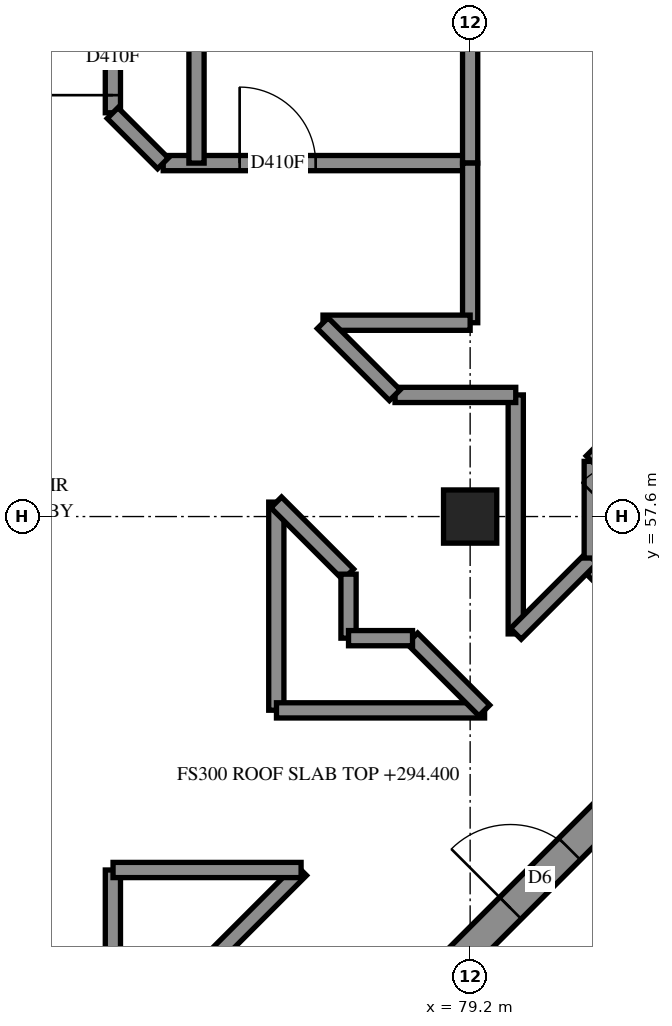
"""IFC4 building model, lengths in metres.
Left out: names, types, materials, properties, quantities, classifications, styles, units other than length and angle.
Written with IfcOpenShell. Run it as: python <this file> out.ifc"""

import sys

from ifc_helpers import new_model, si_unit, direction, frame, frame_2d, origin, origin_2d, place, context, subcontext, project, spatial, polyline, rectangle, outline, extrude, element, fill, save


model = new_model("IFC4")
c1 = context("Model", 3, precision=1e-05, world=origin(), true_north=direction((0.0, 1.0)))
c2 = subcontext(c1, "Body", "Model", "MODEL_VIEW")
j1 = project(units=[si_unit("LENGTHUNIT", "METRE"), si_unit("PLANEANGLEUNIT", "RADIAN")], contexts=[c1])
p1 = place(None, origin())
s1 = spatial("IfcSite", under=j1, at=p1, CompositionType="ELEMENT")
p2 = place(p1, origin())
s2 = spatial("IfcBuilding", under=s1, at=p2, CompositionType="ELEMENT")
p3 = place(p2, frame((0.0, 0.0, 294.4)))
s3 = spatial("IfcBuildingStorey", under=s2, at=p3, CompositionType="ELEMENT", Elevation=294.4)
p4 = place(p3, frame((79.2, 57.6, 0.0), z_axis=(0.0, 0.0, 1.0), x_axis=(1.0, 0.0, 0.0)))
e1 = element("IfcColumn", 1, at=p4, inside=s3, PredefinedType="COLUMN", context=c2, shape_type="SweptSolid", body=[
    extrude(rectangle(XDim=0.7, YDim=0.7, at=origin_2d()), origin(), (0.0, 0.0, 1.0), 3.5),
])
p5 = place(p3, frame((76.513, 49.231, -0.3), z_axis=(0.0, 0.0, 1.0), x_axis=(0.7071067812, 0.7071067812, 0.0)))
e2 = element("IfcWall", 2, at=p5, inside=s3, PredefinedType="SHEAR", context=c2, shape_type="SweptSolid", body=[
    extrude(outline(polyline([(0.0, 0.0), (14.4, 0.0), (14.4, 3.1), (0.0, 3.1), (0.0, 0.0)])), frame((0.0, 0.2, 0.0), z_axis=(0.0, -1.0, 0.0), x_axis=(1.0, 0.0, 0.0)), (0.0, 0.0, 1.0), 0.4),
])
p6 = place(p5, frame((4.55, 0.0, 0.3)))
e3 = element("IfcOpeningElement", 3, at=p6, cuts=e2, PredefinedType="OPENING", context=c2, shape_type="SweptSolid", body=[
    extrude(rectangle(XDim=1.1, YDim=2.1, at=frame_2d((0.55, 1.05))), frame((0.0, 0.21, 0.0), z_axis=(0.0, -1.0, 0.0), x_axis=(1.0, 0.0, 0.0)), (0.0, 0.0, 1.0), 0.42),
])
p7 = place(p5, frame((11.35, 0.0, 0.3)))
e4 = element("IfcOpeningElement", 4, at=p7, cuts=e2, PredefinedType="OPENING", context=c2, shape_type="SweptSolid", body=[
    extrude(rectangle(XDim=1.1, YDim=2.1, at=frame_2d((0.55, 1.05))), frame((0.0, 0.21, 0.0), z_axis=(0.0, -1.0, 0.0), x_axis=(1.0, 0.0, 0.0)), (0.0, 0.0, 1.0), 0.42),
])
p8 = place(p3, frame((80.803, 56.77, 0.0), z_axis=(0.0, 0.0, 1.0), x_axis=(0.7069896038, 0.7072239391, 0.0)))
e5 = element("IfcWall", 5, at=p8, inside=s3, PredefinedType="PARTITIONING", context=c2, shape_type="SweptSolid", body=[
    extrude(rectangle(XDim=8.535, YDim=0.2, at=frame_2d((4.267, 0.0))), origin(), (0.0, 0.0, 1.0), 3.5),
])
p9 = place(p8, frame((0.811, 0.0, 0.0)))
e6 = element("IfcOpeningElement", 6, at=p9, cuts=e5, PredefinedType="OPENING", context=c2, shape_type="SweptSolid", body=[
    extrude(rectangle(XDim=1.0, YDim=2.1, at=frame_2d((0.5, 1.05))), frame((0.0, 0.11, 0.0), z_axis=(0.0, -1.0, 0.0), x_axis=(1.0, 0.0, 0.0)), (0.0, 0.0, 1.0), 0.22),
])
p10 = place(p3, frame((74.5, 62.912, 0.0), z_axis=(0.0, 0.0, 1.0), x_axis=(0.0, 1.0, 0.0)))
e7 = element("IfcWall", 7, at=p10, inside=s3, PredefinedType="PARTITIONING", context=c2, shape_type="SweptSolid", body=[
    extrude(rectangle(XDim=4.388, YDim=0.2, at=frame_2d((2.194, 0.0))), origin(), (0.0, 0.0, 1.0), 3.5),
])
p11 = place(p10, frame((0.232, 0.0, 0.0)))
e8 = element("IfcOpeningElement", 8, at=p11, cuts=e7, PredefinedType="OPENING", context=c2, shape_type="SweptSolid", body=[
    extrude(rectangle(XDim=1.0, YDim=2.1, at=frame_2d((0.5, 1.05))), frame((0.0, 0.11, 0.0), z_axis=(0.0, -1.0, 0.0), x_axis=(1.0, 0.0, 0.0)), (0.0, 0.0, 1.0), 0.22),
])
p12 = place(p3, frame((75.162, 62.25, 0.0), z_axis=(0.0, 0.0, 1.0), x_axis=(1.0, 0.0, 0.0)))
e9 = element("IfcWall", 9, at=p12, inside=s3, PredefinedType="PARTITIONING", context=c2, shape_type="SweptSolid", body=[
    extrude(rectangle(XDim=4.038, YDim=0.2, at=frame_2d((2.019, 0.0))), origin(), (0.0, 0.0, 1.0), 3.5),
])
p13 = place(p12, frame((1.006, 0.0, 0.0)))
e10 = element("IfcOpeningElement", 10, at=p13, cuts=e9, PredefinedType="OPENING", context=c2, shape_type="SweptSolid", body=[
    extrude(rectangle(XDim=1.0, YDim=2.1, at=frame_2d((0.5, 1.05))), frame((0.0, 0.11, 0.0), z_axis=(0.0, -1.0, 0.0), x_axis=(1.0, 0.0, 0.0)), (0.0, 0.0, 1.0), 0.22),
])
p14 = place(p3, frame((74.501, 50.473, 0.0), z_axis=(0.0, 0.0, 1.0), x_axis=(0.7071067812, 0.7071067812, 0.0)))
e11 = element("IfcWall", 11, at=p14, inside=s3, PredefinedType="PARTITIONING", context=c2, shape_type="SweptSolid", body=[
    extrude(rectangle(XDim=3.502, YDim=0.2, at=frame_2d((1.751, 0.0))), origin(), (0.0, 0.0, 1.0), 3.5),
])
p15 = place(p3, frame((79.8, 56.056, 0.0), z_axis=(0.0, 0.0, 1.0), x_axis=(0.0, 1.0, 0.0)))
e12 = element("IfcWall", 12, at=p15, inside=s3, PredefinedType="PARTITIONING", context=c2, shape_type="SweptSolid", body=[
    extrude(rectangle(XDim=3.144, YDim=0.2, at=frame_2d((1.572, 0.0))), origin(), (0.0, 0.0, 1.0), 3.5),
])
for number, where, z_axis, x_axis in (
    (13, (76.65, 55.052, 0.0), (0.0, 0.0, 1.0), (0.0, 1.0, 0.0)),
    (14, (76.652, 55.05, 0.0), (0.0, 0.0, 1.0), (1.0, 0.0, 0.0)),
):
    element("IfcWall", number, at=place(p3, frame(where, z_axis=z_axis, x_axis=x_axis)), inside=s3, PredefinedType="PARTITIONING", context=c2, shape_type="SweptSolid", body=[
        extrude(rectangle(XDim=2.738, YDim=0.2, at=frame_2d((1.369, 0.0))), origin(), (0.0, 0.0, 1.0), 3.5),
    ])
p16 = place(p3, frame((74.5, 50.474, 0.0), z_axis=(0.0, 0.0, 1.0), x_axis=(0.0, 1.0, 0.0)))
e15 = element("IfcWall", 15, at=p16, inside=s3, PredefinedType="PARTITIONING", context=c2, shape_type="SweptSolid", body=[
    extrude(rectangle(XDim=2.476, YDim=0.2, at=frame_2d((1.238, 0.0))), origin(), (0.0, 0.0, 1.0), 3.5),
])
p17 = place(p3, frame((74.502, 52.95, 0.0), z_axis=(0.0, 0.0, 1.0), x_axis=(1.0, 0.0, 0.0)))
e16 = element("IfcWall", 16, at=p17, inside=s3, PredefinedType="PARTITIONING", context=c2, shape_type="SweptSolid", body=[
    extrude(rectangle(XDim=2.474, YDim=0.2, at=frame_2d((1.237, 0.0))), origin(), (0.0, 0.0, 1.0), 3.5),
])
p18 = place(p3, frame((79.2, 62.25, 0.0), z_axis=(0.0, 0.0, 1.0), x_axis=(0.0, 1.0, 0.0)))
e17 = element("IfcWall", 17, at=p18, inside=s3, PredefinedType="PARTITIONING", context=c2, shape_type="SweptSolid", body=[
    extrude(rectangle(XDim=2.2, YDim=0.2, at=frame_2d((1.1, 0.0))), origin(), (0.0, 0.0, 1.0), 3.5),
])
p19 = place(p3, frame((79.2, 60.15, 0.0), z_axis=(0.0, 0.0, 1.0), x_axis=(0.0, 1.0, 0.0)))
e18 = element("IfcWall", 18, at=p19, inside=s3, PredefinedType="PARTITIONING", context=c2, shape_type="SweptSolid", body=[
    extrude(rectangle(XDim=2.1, YDim=0.2, at=frame_2d((1.05, 0.0))), origin(), (0.0, 0.0, 1.0), 3.5),
])
p20 = place(p3, frame((77.264, 60.15, 0.0), z_axis=(0.0, 0.0, 1.0), x_axis=(1.0, 0.0, 0.0)))
e19 = element("IfcWall", 19, at=p20, inside=s3, PredefinedType="PARTITIONING", context=c2, shape_type="SweptSolid", body=[
    extrude(rectangle(XDim=1.936, YDim=0.2, at=frame_2d((0.968, 0.0))), origin(), (0.0, 0.0, 1.0), 3.5),
])
p21 = place(p3, frame((78.212, 59.2, 0.0), z_axis=(0.0, 0.0, 1.0), x_axis=(1.0, 0.0, 0.0)))
e20 = element("IfcWall", 20, at=p21, inside=s3, PredefinedType="PARTITIONING", context=c2, shape_type="SweptSolid", body=[
    extrude(rectangle(XDim=1.588, YDim=0.2, at=frame_2d((0.794, 0.0))), origin(), (0.0, 0.0, 1.0), 3.5),
])
p22 = place(p3, frame((79.801, 56.057, 0.0), z_axis=(0.0, 0.0, 1.0), x_axis=(0.7071067812, 0.7071067812, 0.0)))
e21 = element("IfcWall", 21, at=p22, inside=s3, PredefinedType="PARTITIONING", context=c2, shape_type="SweptSolid", body=[
    extrude(rectangle(XDim=1.411, YDim=0.2, at=frame_2d((0.706, 0.0))), origin(), (0.0, 0.0, 1.0), 3.5),
])
for number, where, z_axis, x_axis in (
    (22, (78.439, 55.997, 0.0), (0.0, 0.0, 1.0), (0.707, -0.707, 0.0)),
    (23, (77.26, 60.145, 0.0), (0.0, 0.0, 1.0), (0.707, -0.707, 0.0)),
    (24, (76.649, 57.787, 0.0), (0.0, 0.0, 1.0), (0.707, -0.707, 0.0)),
):
    element("IfcWall", number, at=place(p3, frame(where, z_axis=z_axis, x_axis=x_axis)), inside=s3, PredefinedType="PARTITIONING", context=c2, shape_type="SweptSolid", body=[
        extrude(rectangle(XDim=1.341, YDim=0.2, at=frame_2d((0.67, 0.0))), origin(), (0.0, 0.0, 1.0), 3.5),
    ])
p23 = place(p3, frame((80.8, 57.054, 0.0), z_axis=(0.0, 0.0, 1.0), x_axis=(0.0, 1.0, 0.0)))
e25 = element("IfcWall", 25, at=p23, inside=s3, PredefinedType="PARTITIONING", context=c2, shape_type="SweptSolid", body=[
    extrude(rectangle(XDim=1.272, YDim=0.2, at=frame_2d((0.636, 0.0))), origin(), (0.0, 0.0, 1.0), 3.5),
])
p24 = place(p3, frame((74.496, 62.908, 0.0), z_axis=(0.0, 0.0, 1.0), x_axis=(0.7071067812, -0.7071067812, 0.0)))
e26 = element("IfcWall", 26, at=p24, inside=s3, PredefinedType="PARTITIONING", context=c2, shape_type="SweptSolid", body=[
    extrude(rectangle(XDim=0.936, YDim=0.2, at=frame_2d((0.468, 0.0))), origin(), (0.0, 0.0, 1.0), 3.5),
])
for number, where, z_axis, x_axis in (
    (27, (77.6, 56.0, 0.0), (0.0, 0.0, 1.0), (0.0, 1.0, 0.0)),
    (28, (77.6, 56.0, 0.0), (0.0, 0.0, 1.0), (1.0, 0.0, 0.0)),
):
    element("IfcWall", number, at=place(p3, frame(where, z_axis=z_axis, x_axis=x_axis)), inside=s3, PredefinedType="PARTITIONING", context=c2, shape_type="SweptSolid", body=[
        extrude(rectangle(XDim=0.842, YDim=0.2, at=frame_2d((0.421, 0.0))), origin(), (0.0, 0.0, 1.0), 3.5),
    ])
p25 = place(p3, frame((75.6, 62.25, 0.0), z_axis=(0.0, 0.0, 1.0), x_axis=(0.0, 1.0, 0.0)))
e29 = element("IfcWall", 29, at=p25, inside=s3, PredefinedType="PARTITIONING", context=c2, shape_type="SweptSolid", body=[
    extrude(outline(polyline([(0.0, -0.1), (10.55, -0.1), (10.55, 0.1), (0.0, 0.1), (0.0, -0.1)])), origin(), (0.0, 0.0, 1.0), 3.5),
])
p26 = place(p3, frame((80.799, 58.327, 0.0), z_axis=(0.0, 0.0, 1.0), x_axis=(0.7071067812, 0.7071067812, 0.0)))
e30 = element("IfcWall", 30, at=p26, inside=s3, PredefinedType="PARTITIONING", context=c2, shape_type="SweptSolid", body=[
    extrude(outline(polyline([(0.0, -0.1), (9.338, -0.1), (9.338, 0.1), (0.0, 0.1), (0.0, -0.1)])), origin(), (0.0, 0.0, 1.0), 3.5),
])
p27 = place(p6, origin())
e31 = element("IfcDoor", 31, at=p27, inside=s3, OperationType="DOUBLE_DOOR_SINGLE_SWING", PredefinedType="DOOR", context=c2, shape_type="SweptSolid", body=[
    extrude(rectangle(XDim=1.1, YDim=2.1, at=frame_2d((0.55, 1.05))), frame((0.0, 0.025, 0.0), z_axis=(0.0, -1.0, 0.0), x_axis=(1.0, 0.0, 0.0)), (0.0, 0.0, 1.0), 0.05),
])
fill(e3, e31)
p28 = place(p11, origin())
e32 = element("IfcDoor", 32, at=p28, inside=s3, OperationType="SINGLE_SWING_RIGHT", PredefinedType="DOOR", context=c2, shape_type="SweptSolid", body=[
    extrude(rectangle(XDim=1.0, YDim=2.1, at=frame_2d((0.5, 1.05))), frame((0.0, 0.025, 0.0), z_axis=(0.0, -1.0, 0.0), x_axis=(1.0, 0.0, 0.0)), (0.0, 0.0, 1.0), 0.05),
])
fill(e8, e32)
p29 = place(p13, origin())
e33 = element("IfcDoor", 33, at=p29, inside=s3, OperationType="SINGLE_SWING_LEFT", PredefinedType="DOOR", context=c2, shape_type="SweptSolid", body=[
    extrude(rectangle(XDim=1.0, YDim=2.1, at=frame_2d((0.5, 1.05))), frame((0.0, 0.025, 0.0), z_axis=(0.0, -1.0, 0.0), x_axis=(1.0, 0.0, 0.0)), (0.0, 0.0, 1.0), 0.05),
])
fill(e10, e33)
save(model, sys.argv[1])
